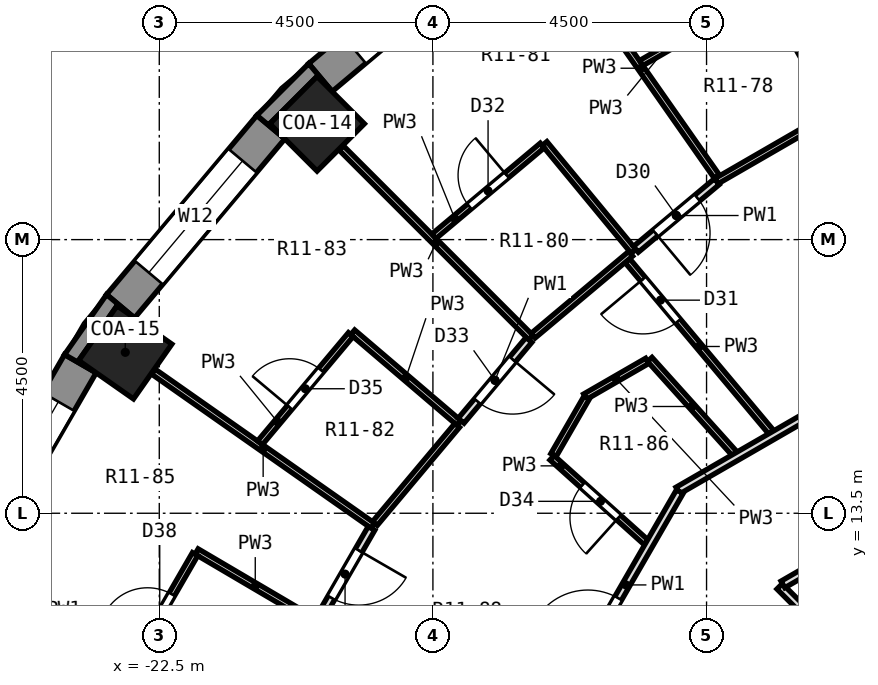
"""IFC4 building model, lengths in metres.
Left out: names, types, materials, properties, quantities, classifications, styles, units other than length and angle.
Written with IfcOpenShell. Run it as: python <this file> out.ifc"""

import sys

from ifc_helpers import new_model, si_unit, direction, frame, frame_2d, origin, origin_2d, place, context, subcontext, project, spatial, polyline, rectangle, outline, extrude, element, fill, save


model = new_model("IFC4")
c1 = context("Model", 3, precision=1e-05, world=origin(), true_north=direction((0.0, 1.0)))
c2 = subcontext(c1, "Body", "Model", "MODEL_VIEW")
j1 = project(units=[si_unit("LENGTHUNIT", "METRE"), si_unit("PLANEANGLEUNIT", "RADIAN")], contexts=[c1])
p1 = place(None, origin())
s1 = spatial("IfcSite", under=j1, at=p1, CompositionType="ELEMENT")
p2 = place(p1, origin())
s2 = spatial("IfcBuilding", under=s1, at=p2, CompositionType="ELEMENT")
p3 = place(p2, frame((0.0, 0.0, 46.1)))
s3 = spatial("IfcBuildingStorey", under=s2, at=p3, CompositionType="ELEMENT", Elevation=46.1)
for number, where, z_axis, x_axis in (
    (1, (-19.905, 19.905, 0.0), (0.0, 0.0, 1.0), (-0.707, 0.707, 0.0)),
    (2, (-23.059, 16.146, 0.0), (0.0, 0.0, 1.0), (-0.819, 0.574, 0.0)),
):
    element("IfcColumn", number, at=place(p3, frame(where, z_axis=z_axis, x_axis=x_axis)), inside=s3, PredefinedType="COLUMN", context=c2, shape_type="SweptSolid", body=[
        extrude(rectangle(XDim=1.1, YDim=1.1, at=origin_2d()), origin(), (0.0, 0.0, 1.0), 3.3),
    ])
p4 = place(p3, frame((-16.904, 23.137, 0.0), z_axis=(0.0, 0.0, 1.0), x_axis=(-0.766026164483, -0.642809392687, 0.0)))
e3 = element("IfcWall", 3, at=p4, inside=s3, PredefinedType="SOLIDWALL", context=c2, shape_type="SweptSolid", body=[
    extrude(rectangle(XDim=3.846, YDim=0.6, at=frame_2d((1.923, 0.0))), origin(), (0.0, 0.0, 1.0), 2.75),
])
p5 = place(p4, frame((0.723, 0.0, 0.9)))
e4 = element("IfcOpeningElement", 4, at=p5, cuts=e3, PredefinedType="OPENING", context=c2, shape_type="SweptSolid", body=[
    extrude(rectangle(XDim=2.4, YDim=1.8, at=frame_2d((1.2, 0.9))), frame((0.0, 0.312, 0.0), z_axis=(0.0, -1.0, 0.0), x_axis=(1.0, 0.0, 0.0)), (0.0, 0.0, 1.0), 0.624),
])
p6 = place(p3, frame((-20.665, 19.85, 0.0), z_axis=(0.0, 0.0, 1.0), x_axis=(-0.642809392687, -0.766026164483, 0.0)))
e5 = element("IfcWall", 5, at=p6, inside=s3, PredefinedType="SOLIDWALL", context=c2, shape_type="SweptSolid", body=[
    extrude(rectangle(XDim=3.846, YDim=0.6, at=frame_2d((1.923, 0.0))), origin(), (0.0, 0.0, 1.0), 2.75),
])
p7 = place(p6, frame((0.723, 0.0, 0.9)))
e6 = element("IfcOpeningElement", 6, at=p7, cuts=e5, PredefinedType="OPENING", context=c2, shape_type="SweptSolid", body=[
    extrude(rectangle(XDim=2.4, YDim=1.8, at=frame_2d((1.2, 0.9))), frame((0.0, 0.312, 0.0), z_axis=(0.0, -1.0, 0.0), x_axis=(1.0, 0.0, 0.0)), (0.0, 0.0, 1.0), 0.624),
])
p8 = place(p3, frame((-23.798, 15.96, 0.0), z_axis=(0.0, 0.0, 1.0), x_axis=(-0.499989888488, -0.86603124159, 0.0)))
e7 = element("IfcWall", 7, at=p8, inside=s3, PredefinedType="SOLIDWALL", context=c2, shape_type="SweptSolid", body=[
    extrude(rectangle(XDim=3.846, YDim=0.6, at=frame_2d((1.923, 0.0))), origin(), (0.0, 0.0, 1.0), 2.75),
])
p9 = place(p8, frame((0.723, 0.0, 0.9)))
e8 = element("IfcOpeningElement", 8, at=p9, cuts=e7, PredefinedType="OPENING", context=c2, shape_type="SweptSolid", body=[
    extrude(rectangle(XDim=2.4, YDim=1.8, at=frame_2d((1.2, 0.9))), frame((0.0, 0.312, 0.0), z_axis=(0.0, -1.0, 0.0), x_axis=(1.0, 0.0, 0.0)), (0.0, 0.0, 1.0), 0.624),
])
p10 = place(p3, origin())
e9 = element("IfcWall", 9, at=p10, inside=s3, PredefinedType="SOLIDWALL", context=c2, shape_type="SweptSolid", body=[
    extrude(outline(polyline([(-20.895, 20.043), (-20.435, 19.657), (-20.683, 19.905), (-19.905, 20.683), (-19.657, 20.435), (-20.043, 20.895), (-20.895, 20.043)])), origin(), (0.0, 0.0, 1.0), 2.75),
])
p11 = place(p3, origin())
e10 = element("IfcWall", 10, at=p11, inside=s3, PredefinedType="SOLIDWALL", context=c2, shape_type="SweptSolid", body=[
    extrude(outline(polyline([(-23.367, 17.097), (-24.058, 16.11), (-23.538, 15.81), (-23.825, 16.011), (-23.194, 16.912), (-22.907, 16.711), (-23.367, 17.097)])), origin(), (0.0, 0.0, 1.0), 2.75),
])
p12 = place(p3, frame((-12.519, 22.09, 0.0), z_axis=(0.0, 0.0, 1.0), x_axis=(0.49306078006, -0.869994866173, 0.0)))
e11 = element("IfcWall", 11, at=p12, inside=s3, PredefinedType="PARTITIONING", context=c2, shape_type="SweptSolid", body=[
    extrude(rectangle(XDim=2.3, YDim=0.1, at=frame_2d((1.15, 0.0))), origin(), (0.0, 0.0, 1.0), 2.75),
])
p13 = place(p3, frame((-15.825, 22.6, 0.0), z_axis=(0.0, 0.0, 1.0), x_axis=(0.573326730149, -0.819326833746, 0.0)))
e12 = element("IfcWall", 12, at=p13, inside=s3, PredefinedType="PARTITIONING", context=c2, shape_type="SweptSolid", body=[
    extrude(rectangle(XDim=4.35, YDim=0.1, at=frame_2d((2.175, 0.0))), origin(), (0.0, 0.0, 1.0), 2.75),
])
p14 = place(p3, frame((-16.164, 19.58, 0.0), z_axis=(0.0, 0.0, 1.0), x_axis=(0.636700344293, -0.771111322428, 0.0)))
e13 = element("IfcWall", 13, at=p14, inside=s3, PredefinedType="PARTITIONING", context=c2, shape_type="SweptSolid", body=[
    extrude(rectangle(XDim=2.3, YDim=0.1, at=frame_2d((1.15, 0.0))), origin(), (0.0, 0.0, 1.0), 2.75),
])
p15 = place(p3, frame((-14.803, 17.655, 0.0), z_axis=(0.0, 0.0, 1.0), x_axis=(0.642514396039, -0.766273613589, 0.0)))
e14 = element("IfcWall", 14, at=p15, inside=s3, PredefinedType="PARTITIONING", context=c2, shape_type="SweptSolid", body=[
    extrude(rectangle(XDim=3.685, YDim=0.1, at=frame_2d((1.843, 0.0))), origin(), (0.0, 0.0, 1.0), 2.75),
])
p16 = place(p15, frame((0.399, 0.0, 0.0)))
e15 = element("IfcOpeningElement", 15, at=p16, cuts=e14, PredefinedType="OPENING", context=c2, shape_type="SweptSolid", body=[
    extrude(rectangle(XDim=0.9, YDim=2.1, at=frame_2d((0.45, 1.05))), frame((0.0, 0.062, 0.0), z_axis=(0.0, -1.0, 0.0), x_axis=(1.0, 0.0, 0.0)), (0.0, 0.0, 1.0), 0.124),
])
p17 = place(p3, frame((-14.434, 16.03, 0.0), z_axis=(0.0, 0.0, 1.0), x_axis=(0.669113598408, -0.743160139153, 0.0)))
e16 = element("IfcWall", 16, at=p17, inside=s3, PredefinedType="PARTITIONING", context=c2, shape_type="SweptSolid", body=[
    extrude(rectangle(XDim=2.084, YDim=0.1, at=frame_2d((1.042, 0.0))), origin(), (0.0, 0.0, 1.0), 2.75),
])
p18 = place(p3, frame((-19.509, 19.509, 0.0), z_axis=(0.0, 0.0, 1.0), x_axis=(0.707106781187, -0.707106781187, 0.0)))
e17 = element("IfcWall", 17, at=p18, inside=s3, PredefinedType="PARTITIONING", context=c2, shape_type="SweptSolid", body=[
    extrude(rectangle(XDim=4.413, YDim=0.1, at=frame_2d((2.206, 0.0))), origin(), (0.0, 0.0, 1.0), 2.75),
])
p19 = place(p3, frame((-12.298, 12.298, 0.0), z_axis=(0.0, 0.0, 1.0), x_axis=(0.707106781187, -0.707106781187, 0.0)))
e18 = element("IfcWall", 18, at=p19, inside=s3, PredefinedType="PARTITIONING", context=c2, shape_type="SweptSolid", body=[
    extrude(rectangle(XDim=7.8, YDim=0.125, at=frame_2d((3.9, 0.0))), origin(), (0.0, 0.0, 1.0), 2.75),
])
p20 = place(p3, frame((-16.042, 14.413, 0.0), z_axis=(0.0, 0.0, 1.0), x_axis=(0.743835847678, -0.668362350608, 0.0)))
e19 = element("IfcWall", 19, at=p20, inside=s3, PredefinedType="PARTITIONING", context=c2, shape_type="SweptSolid", body=[
    extrude(rectangle(XDim=2.083, YDim=0.1, at=frame_2d((1.042, 0.0))), origin(), (0.0, 0.0, 1.0), 2.75),
])
p21 = place(p20, frame((0.673, 0.0, 0.0)))
e20 = element("IfcOpeningElement", 20, at=p21, cuts=e19, PredefinedType="OPENING", context=c2, shape_type="SweptSolid", body=[
    extrude(rectangle(XDim=0.8, YDim=2.1, at=frame_2d((0.4, 1.05))), frame((0.0, 0.062, 0.0), z_axis=(0.0, -1.0, 0.0), x_axis=(1.0, 0.0, 0.0)), (0.0, 0.0, 1.0), 0.124),
])
p22 = place(p3, frame((-19.319, 16.476, 0.0), z_axis=(0.0, 0.0, 1.0), x_axis=(0.760722977127, -0.649076691979, 0.0)))
e21 = element("IfcWall", 21, at=p22, inside=s3, PredefinedType="PARTITIONING", context=c2, shape_type="SweptSolid", body=[
    extrude(rectangle(XDim=2.301, YDim=0.1, at=frame_2d((1.15, 0.0))), origin(), (0.0, 0.0, 1.0), 2.75),
])
p23 = place(p3, frame((-22.597, 15.829, 0.0), z_axis=(0.0, 0.0, 1.0), x_axis=(0.818435722788, -0.57459809229, 0.0)))
e22 = element("IfcWall", 22, at=p23, inside=s3, PredefinedType="PARTITIONING", context=c2, shape_type="SweptSolid", body=[
    extrude(rectangle(XDim=4.413, YDim=0.1, at=frame_2d((2.206, 0.0))), origin(), (0.0, 0.0, 1.0), 2.75),
])
p24 = place(p3, frame((-21.886, 12.871, 0.0), z_axis=(0.0, 0.0, 1.0), x_axis=(0.861880909545, -0.507110735206, 0.0)))
e23 = element("IfcWall", 23, at=p24, inside=s3, PredefinedType="PARTITIONING", context=c2, shape_type="SweptSolid", body=[
    extrude(rectangle(XDim=2.237, YDim=0.1, at=frame_2d((1.119, 0.0))), origin(), (0.0, 0.0, 1.0), 2.75),
])
p25 = place(p3, frame((-12.244, 12.329, 0.0), z_axis=(0.0, 0.0, 1.0), x_axis=(0.865979941794, 0.500078734211, 0.0)))
e24 = element("IfcWall", 24, at=p25, inside=s3, PredefinedType="PARTITIONING", context=c2, shape_type="SweptSolid", body=[
    extrude(rectangle(XDim=8.877, YDim=0.125, at=frame_2d((4.439, 0.0))), origin(), (0.0, 0.0, 1.0), 2.75),
])
p26 = place(p25, frame((3.501, 0.0, 0.0)))
e25 = element("IfcOpeningElement", 25, at=p26, cuts=e24, PredefinedType="OPENING", context=c2, shape_type="SweptSolid", body=[
    extrude(rectangle(XDim=1.0, YDim=2.1, at=frame_2d((0.5, 1.05))), frame((0.0, 0.074, 0.0), z_axis=(0.0, -1.0, 0.0), x_axis=(1.0, 0.0, 0.0)), (0.0, 0.0, 1.0), 0.149),
])
p27 = place(p3, frame((-13.971, 13.873, 0.0), z_axis=(0.0, 0.0, 1.0), x_axis=(0.86602502492, 0.500000656212, 0.0)))
e26 = element("IfcWall", 26, at=p27, inside=s3, PredefinedType="PARTITIONING", context=c2, shape_type="SweptSolid", body=[
    extrude(rectangle(XDim=10.179, YDim=0.125, at=frame_2d((5.09, 0.0))), origin(), (0.0, 0.0, 1.0), 2.75),
])
p28 = place(p3, frame((-15.496, 15.417, 0.0), z_axis=(0.0, 0.0, 1.0), x_axis=(0.866140661503, 0.499800314617, 0.0)))
e27 = element("IfcWall", 27, at=p28, inside=s3, PredefinedType="PARTITIONING", context=c2, shape_type="SweptSolid", body=[
    extrude(rectangle(XDim=1.176, YDim=0.1, at=frame_2d((0.588, 0.0))), origin(), (0.0, 0.0, 1.0), 2.75),
])
p29 = place(p3, frame((-13.338, 18.961, 0.0), z_axis=(0.0, 0.0, 1.0), x_axis=(0.865883187712, 0.500246244601, 0.0)))
e28 = element("IfcWall", 28, at=p29, inside=s3, PredefinedType="PARTITIONING", context=c2, shape_type="SweptSolid", body=[
    extrude(rectangle(XDim=2.206, YDim=0.1, at=frame_2d((1.103, 0.0))), origin(), (0.0, 0.0, 1.0), 2.75),
])
p30 = place(p3, frame((-14.575, 20.902, 0.0), z_axis=(0.0, 0.0, 1.0), x_axis=(0.865919666768, 0.50018309718, 0.0)))
e29 = element("IfcWall", 29, at=p30, inside=s3, PredefinedType="PARTITIONING", context=c2, shape_type="SweptSolid", body=[
    extrude(rectangle(XDim=2.324, YDim=0.1, at=frame_2d((1.162, 0.0))), origin(), (0.0, 0.0, 1.0), 2.75),
])
p31 = place(p30, frame((0.762, 0.0, 0.0)))
e30 = element("IfcOpeningElement", 30, at=p31, cuts=e29, PredefinedType="OPENING", context=c2, shape_type="SweptSolid", body=[
    extrude(rectangle(XDim=0.8, YDim=2.1, at=frame_2d((0.4, 1.05))), frame((0.0, 0.062, 0.0), z_axis=(0.0, -1.0, 0.0), x_axis=(1.0, 0.0, 0.0)), (0.0, 0.0, 1.0), 0.124),
])
p32 = place(p3, frame((-14.663, 17.84, 0.0), z_axis=(0.0, 0.0, 1.0), x_axis=(0.767205284681, 0.641401630149, 0.0)))
e31 = element("IfcWall", 31, at=p32, inside=s3, PredefinedType="PARTITIONING", context=c2, shape_type="SweptSolid", body=[
    extrude(rectangle(XDim=1.735, YDim=0.125, at=frame_2d((0.867, 0.0))), origin(), (0.0, 0.0, 1.0), 2.75),
])
p33 = place(p32, frame((0.417, 0.0, 0.0)))
e32 = element("IfcOpeningElement", 32, at=p33, cuts=e31, PredefinedType="OPENING", context=c2, shape_type="SweptSolid", body=[
    extrude(rectangle(XDim=0.9, YDim=2.1, at=frame_2d((0.45, 1.05))), frame((0.0, 0.074, 0.0), z_axis=(0.0, -1.0, 0.0), x_axis=(1.0, 0.0, 0.0)), (0.0, 0.0, 1.0), 0.149),
])
p34 = place(p3, frame((-16.351, 16.421, 0.0), z_axis=(0.0, 0.0, 1.0), x_axis=(0.765854222204, 0.643014238048, 0.0)))
e33 = element("IfcWall", 33, at=p34, inside=s3, PredefinedType="PARTITIONING", context=c2, shape_type="SweptSolid", body=[
    extrude(rectangle(XDim=2.093, YDim=0.1, at=frame_2d((1.046, 0.0))), origin(), (0.0, 0.0, 1.0), 2.75),
])
p35 = place(p3, frame((-17.984, 18.054, 0.0), z_axis=(0.0, 0.0, 1.0), x_axis=(0.766254925891, 0.642536682648, 0.0)))
e34 = element("IfcWall", 34, at=p35, inside=s3, PredefinedType="PARTITIONING", context=c2, shape_type="SweptSolid", body=[
    extrude(rectangle(XDim=2.325, YDim=0.1, at=frame_2d((1.162, 0.0))), origin(), (0.0, 0.0, 1.0), 2.75),
])
p36 = place(p35, frame((0.762, 0.0, 0.0)))
e35 = element("IfcOpeningElement", 35, at=p36, cuts=e34, PredefinedType="OPENING", context=c2, shape_type="SweptSolid", body=[
    extrude(rectangle(XDim=0.8, YDim=2.1, at=frame_2d((0.4, 1.05))), frame((0.0, 0.062, 0.0), z_axis=(0.0, -1.0, 0.0), x_axis=(1.0, 0.0, 0.0)), (0.0, 0.0, 1.0), 0.124),
])
p37 = place(p3, frame((-18.954, 13.332, 0.0), z_axis=(0.0, 0.0, 1.0), x_axis=(0.642759429892, 0.766068087891, 0.0)))
e36 = element("IfcWall", 36, at=p37, inside=s3, PredefinedType="PARTITIONING", context=c2, shape_type="SweptSolid", body=[
    extrude(rectangle(XDim=2.105, YDim=0.1, at=frame_2d((1.052, 0.0))), origin(), (0.0, 0.0, 1.0), 2.75),
])
p38 = place(p3, frame((-17.537, 15.021, 0.0), z_axis=(0.0, 0.0, 1.0), x_axis=(0.642878617967, 0.765968068891, 0.0)))
e37 = element("IfcWall", 37, at=p38, inside=s3, PredefinedType="PARTITIONING", context=c2, shape_type="SweptSolid", body=[
    extrude(rectangle(XDim=1.736, YDim=0.125, at=frame_2d((0.868, 0.0))), origin(), (0.0, 0.0, 1.0), 2.75),
])
p39 = place(p38, frame((0.418, 0.0, 0.0)))
e38 = element("IfcOpeningElement", 38, at=p39, cuts=e37, PredefinedType="OPENING", context=c2, shape_type="SweptSolid", body=[
    extrude(rectangle(XDim=0.9, YDim=2.1, at=frame_2d((0.45, 1.05))), frame((0.0, 0.074, 0.0), z_axis=(0.0, -1.0, 0.0), x_axis=(1.0, 0.0, 0.0)), (0.0, 0.0, 1.0), 0.149),
])
p40 = place(p3, frame((-20.845, 14.657, 0.0), z_axis=(0.0, 0.0, 1.0), x_axis=(0.642753483788, 0.766073076853, 0.0)))
e39 = element("IfcWall", 39, at=p40, inside=s3, PredefinedType="PARTITIONING", context=c2, shape_type="SweptSolid", body=[
    extrude(rectangle(XDim=2.324, YDim=0.1, at=frame_2d((1.162, 0.0))), origin(), (0.0, 0.0, 1.0), 2.75),
])
p41 = place(p40, frame((0.762, 0.0, 0.0)))
e40 = element("IfcOpeningElement", 40, at=p41, cuts=e39, PredefinedType="OPENING", context=c2, shape_type="SweptSolid", body=[
    extrude(rectangle(XDim=0.8, YDim=2.1, at=frame_2d((0.4, 1.05))), frame((0.0, 0.062, 0.0), z_axis=(0.0, -1.0, 0.0), x_axis=(1.0, 0.0, 0.0)), (0.0, 0.0, 1.0), 0.124),
])
p42 = place(p3, frame((-15.926, 10.416, 0.0), z_axis=(0.0, 0.0, 1.0), x_axis=(0.500020477838, 0.866013580576, 0.0)))
e41 = element("IfcWall", 41, at=p42, inside=s3, PredefinedType="PARTITIONING", context=c2, shape_type="SweptSolid", body=[
    extrude(rectangle(XDim=3.971, YDim=0.125, at=frame_2d((1.985, 0.0))), origin(), (0.0, 0.0, 1.0), 2.75),
])
p43 = place(p42, frame((0.948, 0.0, 0.0)))
e42 = element("IfcOpeningElement", 42, at=p43, cuts=e41, PredefinedType="OPENING", context=c2, shape_type="SweptSolid", body=[
    extrude(rectangle(XDim=1.0, YDim=2.1, at=frame_2d((0.5, 1.05))), frame((0.0, 0.074, 0.0), z_axis=(0.0, -1.0, 0.0), x_axis=(1.0, 0.0, 0.0)), (0.0, 0.0, 1.0), 0.149),
])
p44 = place(p3, frame((-16.017, 14.456, 0.0), z_axis=(0.0, 0.0, 1.0), x_axis=(0.499864305946, 0.86610373261, 0.0)))
e43 = element("IfcWall", 43, at=p44, inside=s3, PredefinedType="PARTITIONING", context=c2, shape_type="SweptSolid", body=[
    extrude(rectangle(XDim=1.093, YDim=0.1, at=frame_2d((0.546, 0.0))), origin(), (0.0, 0.0, 1.0), 2.75),
])
p45 = place(p3, frame((-20.091, 11.38, 0.0), z_axis=(0.0, 0.0, 1.0), x_axis=(0.500296430081, 0.865854192141, 0.0)))
e44 = element("IfcWall", 44, at=p45, inside=s3, PredefinedType="PARTITIONING", context=c2, shape_type="SweptSolid", body=[
    extrude(rectangle(XDim=2.16, YDim=0.125, at=frame_2d((1.08, 0.0))), origin(), (0.0, 0.0, 1.0), 2.75),
])
p46 = place(p45, frame((0.842, 0.0, 0.0)))
e45 = element("IfcOpeningElement", 45, at=p46, cuts=e44, PredefinedType="OPENING", context=c2, shape_type="SweptSolid", body=[
    extrude(rectangle(XDim=0.9, YDim=2.1, at=frame_2d((0.45, 1.05))), frame((0.0, 0.074, 0.0), z_axis=(0.0, -1.0, 0.0), x_axis=(1.0, 0.0, 0.0)), (0.0, 0.0, 1.0), 0.149),
])
p47 = place(p3, frame((-23.073, 10.816, 0.0), z_axis=(0.0, 0.0, 1.0), x_axis=(0.500174283544, 0.865924757748, 0.0)))
e46 = element("IfcWall", 46, at=p47, inside=s3, PredefinedType="PARTITIONING", context=c2, shape_type="SweptSolid", body=[
    extrude(rectangle(XDim=2.323, YDim=0.1, at=frame_2d((1.162, 0.0))), origin(), (0.0, 0.0, 1.0), 2.75),
])
p48 = place(p47, frame((0.76, 0.0, 0.0)))
e47 = element("IfcOpeningElement", 47, at=p48, cuts=e46, PredefinedType="OPENING", context=c2, shape_type="SweptSolid", body=[
    extrude(rectangle(XDim=0.8, YDim=2.1, at=frame_2d((0.4, 1.05))), frame((0.0, 0.062, 0.0), z_axis=(0.0, -1.0, 0.0), x_axis=(1.0, 0.0, 0.0)), (0.0, 0.0, 1.0), 0.124),
])
p49 = place(p5, origin())
e48 = element("IfcWindow", 48, at=p49, inside=s3, PartitioningType="SINGLE_PANEL", PredefinedType="WINDOW", context=c2, shape_type="SweptSolid", body=[
    extrude(rectangle(XDim=2.4, YDim=1.8, at=frame_2d((1.2, 0.9))), frame((0.0, 0.18, 0.0), z_axis=(0.0, -1.0, 0.0), x_axis=(1.0, 0.0, 0.0)), (0.0, 0.0, 1.0), 0.06),
])
fill(e4, e48)
p50 = place(p7, origin())
e49 = element("IfcWindow", 49, at=p50, inside=s3, PartitioningType="SINGLE_PANEL", PredefinedType="WINDOW", context=c2, shape_type="SweptSolid", body=[
    extrude(rectangle(XDim=2.4, YDim=1.8, at=frame_2d((1.2, 0.9))), frame((0.0, 0.18, 0.0), z_axis=(0.0, -1.0, 0.0), x_axis=(1.0, 0.0, 0.0)), (0.0, 0.0, 1.0), 0.06),
])
fill(e6, e49)
p51 = place(p9, origin())
e50 = element("IfcWindow", 50, at=p51, inside=s3, PartitioningType="SINGLE_PANEL", PredefinedType="WINDOW", context=c2, shape_type="SweptSolid", body=[
    extrude(rectangle(XDim=2.4, YDim=1.8, at=frame_2d((1.2, 0.9))), frame((0.0, 0.18, 0.0), z_axis=(0.0, -1.0, 0.0), x_axis=(1.0, 0.0, 0.0)), (0.0, 0.0, 1.0), 0.06),
])
fill(e8, e50)
p52 = place(p33, frame((0.9, 0.0, 0.0), z_axis=(0.0, 0.0, 1.0), x_axis=(-1.0, 0.0, 0.0)))
e51 = element("IfcDoor", 51, at=p52, inside=s3, OperationType="SINGLE_SWING_RIGHT", PredefinedType="DOOR", context=c2, shape_type="SweptSolid", body=[
    extrude(rectangle(XDim=0.9, YDim=2.1, at=frame_2d((0.45, 1.05))), frame((0.0, 0.025, 0.0), z_axis=(0.0, -1.0, 0.0), x_axis=(1.0, 0.0, 0.0)), (0.0, 0.0, 1.0), 0.05),
])
fill(e32, e51)
p53 = place(p16, frame((0.9, 0.0, 0.0), z_axis=(0.0, 0.0, 1.0), x_axis=(-1.0, 0.0, 0.0)))
e52 = element("IfcDoor", 52, at=p53, inside=s3, OperationType="SINGLE_SWING_RIGHT", PredefinedType="DOOR", context=c2, shape_type="SweptSolid", body=[
    extrude(rectangle(XDim=0.9, YDim=2.1, at=frame_2d((0.45, 1.05))), frame((0.0, 0.025, 0.0), z_axis=(0.0, -1.0, 0.0), x_axis=(1.0, 0.0, 0.0)), (0.0, 0.0, 1.0), 0.05),
])
fill(e15, e52)
p54 = place(p36, origin())
e53 = element("IfcDoor", 53, at=p54, inside=s3, OperationType="SINGLE_SWING_RIGHT", PredefinedType="DOOR", context=c2, shape_type="SweptSolid", body=[
    extrude(rectangle(XDim=0.8, YDim=2.1, at=frame_2d((0.4, 1.05))), frame((0.0, 0.025, 0.0), z_axis=(0.0, -1.0, 0.0), x_axis=(1.0, 0.0, 0.0)), (0.0, 0.0, 1.0), 0.05),
])
fill(e35, e53)
p55 = place(p39, frame((0.9, 0.0, 0.0), z_axis=(0.0, 0.0, 1.0), x_axis=(-1.0, 0.0, 0.0)))
e54 = element("IfcDoor", 54, at=p55, inside=s3, OperationType="SINGLE_SWING_LEFT", PredefinedType="DOOR", context=c2, shape_type="SweptSolid", body=[
    extrude(rectangle(XDim=0.9, YDim=2.1, at=frame_2d((0.45, 1.05))), frame((0.0, 0.025, 0.0), z_axis=(0.0, -1.0, 0.0), x_axis=(1.0, 0.0, 0.0)), (0.0, 0.0, 1.0), 0.05),
])
fill(e38, e54)
p56 = place(p21, frame((0.8, 0.0, 0.0), z_axis=(0.0, 0.0, 1.0), x_axis=(-1.0, 0.0, 0.0)))
e55 = element("IfcDoor", 55, at=p56, inside=s3, OperationType="SINGLE_SWING_LEFT", PredefinedType="DOOR", context=c2, shape_type="SweptSolid", body=[
    extrude(rectangle(XDim=0.8, YDim=2.1, at=frame_2d((0.4, 1.05))), frame((0.0, 0.025, 0.0), z_axis=(0.0, -1.0, 0.0), x_axis=(1.0, 0.0, 0.0)), (0.0, 0.0, 1.0), 0.05),
])
fill(e20, e55)
p57 = place(p41, origin())
e56 = element("IfcDoor", 56, at=p57, inside=s3, OperationType="SINGLE_SWING_LEFT", PredefinedType="DOOR", context=c2, shape_type="SweptSolid", body=[
    extrude(rectangle(XDim=0.8, YDim=2.1, at=frame_2d((0.4, 1.05))), frame((0.0, 0.025, 0.0), z_axis=(0.0, -1.0, 0.0), x_axis=(1.0, 0.0, 0.0)), (0.0, 0.0, 1.0), 0.05),
])
fill(e40, e56)
p58 = place(p43, origin())
e57 = element("IfcDoor", 57, at=p58, inside=s3, OperationType="SINGLE_SWING_LEFT", PredefinedType="DOOR", context=c2, shape_type="SweptSolid", body=[
    extrude(rectangle(XDim=1.0, YDim=2.1, at=frame_2d((0.5, 1.05))), frame((0.0, 0.025, 0.0), z_axis=(0.0, -1.0, 0.0), x_axis=(1.0, 0.0, 0.0)), (0.0, 0.0, 1.0), 0.05),
])
fill(e42, e57)
p59 = place(p46, frame((0.9, 0.0, 0.0), z_axis=(0.0, 0.0, 1.0), x_axis=(-1.0, 0.0, 0.0)))
e58 = element("IfcDoor", 58, at=p59, inside=s3, OperationType="SINGLE_SWING_LEFT", PredefinedType="DOOR", context=c2, shape_type="SweptSolid", body=[
    extrude(rectangle(XDim=0.9, YDim=2.1, at=frame_2d((0.45, 1.05))), frame((0.0, 0.025, 0.0), z_axis=(0.0, -1.0, 0.0), x_axis=(1.0, 0.0, 0.0)), (0.0, 0.0, 1.0), 0.05),
])
fill(e45, e58)
p60 = place(p48, origin())
e59 = element("IfcDoor", 59, at=p60, inside=s3, OperationType="SINGLE_SWING_LEFT", PredefinedType="DOOR", context=c2, shape_type="SweptSolid", body=[
    extrude(rectangle(XDim=0.8, YDim=2.1, at=frame_2d((0.4, 1.05))), frame((0.0, 0.025, 0.0), z_axis=(0.0, -1.0, 0.0), x_axis=(1.0, 0.0, 0.0)), (0.0, 0.0, 1.0), 0.05),
])
fill(e47, e59)
save(model, sys.argv[1])
